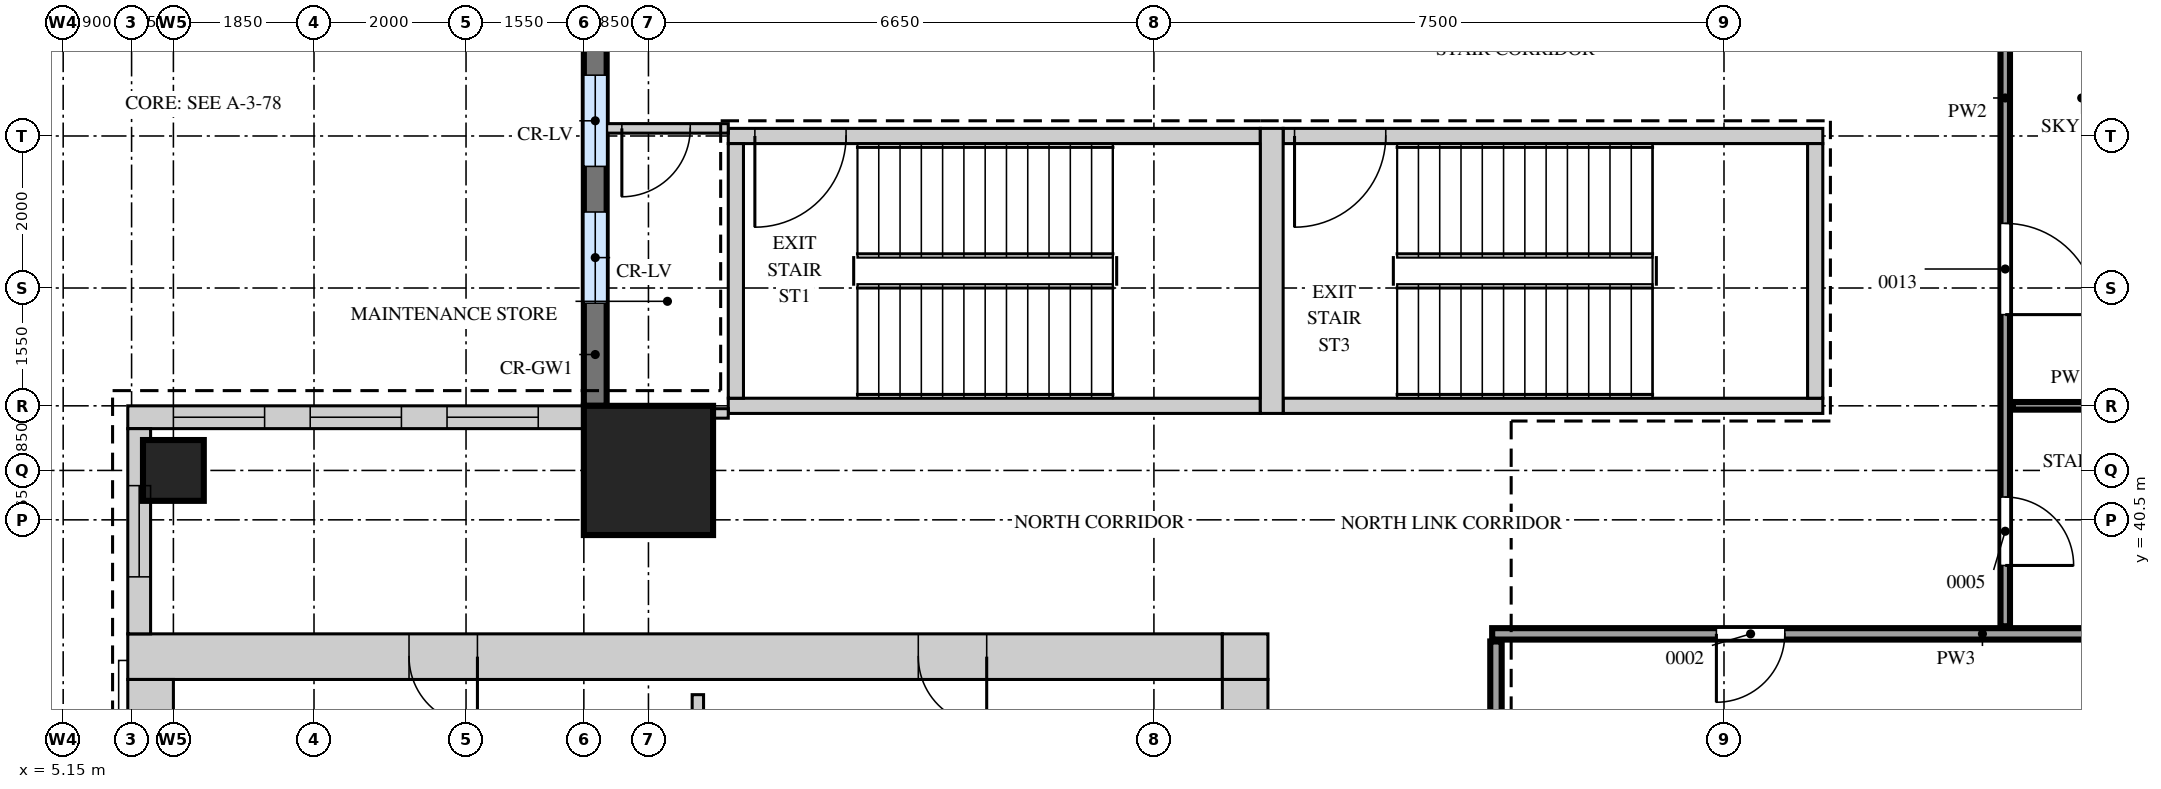
"""IFC4 building model, lengths in metres.
Left out: names, types, materials, properties, quantities, classifications, styles, units other than length and angle.
Written with IfcOpenShell. Run it as: python <this file> out.ifc"""

import sys

from ifc_helpers import new_model, si_unit, direction, frame, frame_2d, origin, origin_2d, place, context, subcontext, project, spatial, rectangle, extrude, source, transform, mapped, element, fill, save


model = new_model("IFC4")
c1 = context("Model", 3, precision=1e-05, world=origin(), true_north=direction((0.0, 1.0)))
c2 = subcontext(c1, "Body", "Model", "MODEL_VIEW")
j1 = project(units=[si_unit("LENGTHUNIT", "METRE"), si_unit("PLANEANGLEUNIT", "RADIAN")], contexts=[c1])
p1 = place(None, origin())
s1 = spatial("IfcSite", under=j1, at=p1, CompositionType="ELEMENT")
p2 = place(p1, origin())
s2 = spatial("IfcBuilding", under=s1, at=p2, CompositionType="ELEMENT")
p3 = place(p2, frame((0.0, 0.0, 339.2)))
s3 = spatial("IfcBuildingStorey", under=s2, at=p3, CompositionType="ELEMENT", Elevation=339.2)
m1 = source(origin(), c2, "Body", "SweptSolid", [
    extrude(rectangle(XDim=14.4, YDim=0.6, at=frame_2d((7.2, 0.0))), origin(), (0.0, 0.0, 1.0), 4.25),
])
p4 = place(p3, frame((6.0, 38.7, 0.0), z_axis=(0.0, 0.0, 1.0), x_axis=(1.0, 0.0, 0.0)))
e1 = element("IfcWall", 1, at=p4, inside=s3, PredefinedType="SHEAR", context=c2, shape_type="MappedRepresentation", body=[
    mapped(m1, transform((0.0, 0.0, 0.0))),
])
m2 = source(origin(), c2, "Body", "SweptSolid", [
    extrude(rectangle(XDim=0.9, YDim=2.1, at=frame_2d((0.45, 1.05))), frame((0.0, 0.31, 0.0), z_axis=(0.0, -1.0, 0.0), x_axis=(1.0, 0.0, 0.0)), (0.0, 0.0, 1.0), 0.62),
])
p5 = place(p4, frame((3.7, 0.0, 0.0)))
e2 = element("IfcOpeningElement", 2, at=p5, cuts=e1, PredefinedType="OPENING", context=c2, shape_type="MappedRepresentation", body=[
    mapped(m2, transform((0.0, 0.0, 0.0))),
])
p6 = place(p4, frame((10.4, 0.0, 0.0)))
e3 = element("IfcOpeningElement", 3, at=p6, cuts=e1, PredefinedType="OPENING", context=c2, shape_type="MappedRepresentation", body=[
    mapped(m2, transform((0.0, 0.0, 0.0))),
])
m3 = source(origin(), c2, "Body", "SweptSolid", [
    extrude(rectangle(XDim=0.6, YDim=0.6, at=frame_2d((0.3, 0.0))), origin(), (0.0, 0.0, 1.0), 4.25),
])
p7 = place(p3, frame((20.4, 38.7, 0.0), z_axis=(0.0, 0.0, 1.0), x_axis=(1.0, 0.0, 0.0)))
e4 = element("IfcWall", 4, at=p7, inside=s3, PredefinedType="SHEAR", context=c2, shape_type="MappedRepresentation", body=[
    mapped(m3, transform((0.0, 0.0, 0.0))),
])
m4 = source(origin(), c2, "Body", "SweptSolid", [
    extrude(rectangle(XDim=22.8, YDim=0.6, at=frame_2d((11.4, 0.0))), origin(), (0.0, 0.0, 1.0), 4.25),
])
p8 = place(p3, frame((20.7, 15.6, 0.0), z_axis=(0.0, 0.0, 1.0), x_axis=(0.0, 1.0, 0.0)))
e5 = element("IfcWall", 5, at=p8, inside=s3, PredefinedType="SHEAR", context=c2, shape_type="MappedRepresentation", body=[
    mapped(m4, transform((0.0, 0.0, 0.0))),
])
p9 = place(p8, frame((8.2, 0.0, 0.0)))
e6 = element("IfcOpeningElement", 6, at=p9, cuts=e5, PredefinedType="OPENING", context=c2, shape_type="MappedRepresentation", body=[
    mapped(m2, transform((0.0, 0.0, 0.0))),
])
p10 = place(p8, frame((11.35, 0.0, 0.0)))
e7 = element("IfcOpeningElement", 7, at=p10, cuts=e5, PredefinedType="OPENING", context=c2, shape_type="MappedRepresentation", body=[
    mapped(m2, transform((0.0, 0.0, 0.0))),
])
p11 = place(p8, frame((14.65, 0.0, 0.0)))
e8 = element("IfcOpeningElement", 8, at=p11, cuts=e5, PredefinedType="OPENING", context=c2, shape_type="MappedRepresentation", body=[
    mapped(m2, transform((0.0, 0.0, 0.0))),
])
p12 = place(p8, frame((1.55, 0.0, 0.0)))
e9 = element("IfcOpeningElement", 9, at=p12, cuts=e5, PredefinedType="OPENING", context=c2, shape_type="MappedRepresentation", body=[
    mapped(m2, transform((0.0, 0.0, 0.0))),
])
p13 = place(p8, frame((5.1, 0.0, 0.0)))
e10 = element("IfcOpeningElement", 10, at=p13, cuts=e5, PredefinedType="OPENING", context=c2, shape_type="MappedRepresentation", body=[
    mapped(m2, transform((0.0, 0.0, 0.0))),
])
p14 = place(p3, frame((6.3, 15.6, 0.0), z_axis=(0.0, 0.0, 1.0), x_axis=(0.0, 1.0, 0.0)))
e11 = element("IfcWall", 11, at=p14, inside=s3, PredefinedType="SHEAR", context=c2, shape_type="MappedRepresentation", body=[
    mapped(m4, transform((0.0, 0.0, 0.0))),
])
m5 = source(origin(), c2, "Body", "SweptSolid", [
    extrude(rectangle(XDim=7.0, YDim=0.2, at=frame_2d((3.5, 0.0))), origin(), (0.0, 0.0, 1.0), 4.25),
])
p15 = place(p3, frame((13.9, 45.55, 0.0), z_axis=(0.0, 0.0, 1.0), x_axis=(1.0, 0.0, 0.0)))
e12 = element("IfcWall", 12, at=p15, inside=s3, PredefinedType="SHEAR", context=c2, shape_type="MappedRepresentation", body=[
    mapped(m5, transform((0.0, 0.0, 0.0))),
])
m6 = source(origin(), c2, "Body", "SweptSolid", [
    extrude(rectangle(XDim=1.2, YDim=2.1, at=frame_2d((0.6, 1.05))), frame((0.0, 0.11, 0.0), z_axis=(0.0, -1.0, 0.0), x_axis=(1.0, 0.0, 0.0)), (0.0, 0.0, 1.0), 0.22),
])
p16 = place(p15, frame((0.35, 0.0, 0.0)))
e13 = element("IfcOpeningElement", 13, at=p16, cuts=e12, PredefinedType="OPENING", context=c2, shape_type="MappedRepresentation", body=[
    mapped(m6, transform((0.0, 0.0, 0.0))),
])
p17 = place(p3, frame((13.9, 42.0, 0.0), z_axis=(0.0, 0.0, 1.0), x_axis=(1.0, 0.0, 0.0)))
e14 = element("IfcWall", 14, at=p17, inside=s3, PredefinedType="SHEAR", context=c2, shape_type="MappedRepresentation", body=[
    mapped(m5, transform((0.0, 0.0, 0.0))),
])
m7 = source(origin(), c2, "Body", "SweptSolid", [
    extrude(rectangle(XDim=7.1, YDim=0.2, at=frame_2d((3.55, 0.0))), origin(), (0.0, 0.0, 1.0), 4.25),
])
p18 = place(p3, frame((21.2, 45.55, 0.0), z_axis=(0.0, 0.0, 1.0), x_axis=(1.0, 0.0, 0.0)))
e15 = element("IfcWall", 15, at=p18, inside=s3, PredefinedType="SHEAR", context=c2, shape_type="MappedRepresentation", body=[
    mapped(m7, transform((0.0, 0.0, 0.0))),
])
p19 = place(p18, frame((0.15, 0.0, 0.0)))
e16 = element("IfcOpeningElement", 16, at=p19, cuts=e15, PredefinedType="OPENING", context=c2, shape_type="MappedRepresentation", body=[
    mapped(m6, transform((0.0, 0.0, 0.0))),
])
p20 = place(p3, frame((21.2, 42.0, 0.0), z_axis=(0.0, 0.0, 1.0), x_axis=(1.0, 0.0, 0.0)))
e17 = element("IfcWall", 17, at=p20, inside=s3, PredefinedType="SHEAR", context=c2, shape_type="MappedRepresentation", body=[
    mapped(m7, transform((0.0, 0.0, 0.0))),
])
m8 = source(origin(), c2, "Body", "SweptSolid", [
    extrude(rectangle(XDim=3.75, YDim=0.3, at=frame_2d((1.875, 0.0))), origin(), (0.0, 0.0, 1.0), 4.25),
])
p21 = place(p3, frame((21.05, 41.9, 0.0), z_axis=(0.0, 0.0, 1.0), x_axis=(0.0, 1.0, 0.0)))
e18 = element("IfcWall", 18, at=p21, inside=s3, PredefinedType="SHEAR", context=c2, shape_type="MappedRepresentation", body=[
    mapped(m8, transform((0.0, 0.0, 0.0))),
])
m9 = source(origin(), c2, "Body", "SweptSolid", [
    extrude(rectangle(XDim=3.35, YDim=0.2, at=frame_2d((1.675, 0.0))), origin(), (0.0, 0.0, 1.0), 4.25),
])
for number, where, z_axis, x_axis in (
    (19, (14.0, 42.1, 0.0), (0.0, 0.0, 1.0), (0.0, 1.0, 0.0)),
    (20, (28.2, 42.1, 0.0), (0.0, 0.0, 1.0), (0.0, 1.0, 0.0)),
):
    element("IfcWall", number, at=place(p3, frame(where, z_axis=z_axis, x_axis=x_axis)), inside=s3, PredefinedType="SHEAR", context=c2, shape_type="MappedRepresentation", body=[
        mapped(m9, transform((0.0, 0.0, 0.0))),
    ])
m10 = source(origin(), c2, "Body", "SweptSolid", [
    extrude(rectangle(XDim=1.7, YDim=1.7, at=origin_2d()), origin(), (0.0, 0.0, 1.0), 4.5),
])
p22 = place(p3, frame((12.85, 41.15, 0.0), z_axis=(0.0, 0.0, 1.0), x_axis=(1.0, 0.0, 0.0)))
e21 = element("IfcColumn", 21, at=p22, inside=s3, PredefinedType="COLUMN", context=c2, shape_type="MappedRepresentation", body=[
    mapped(m10, transform((0.0, 0.0, 0.0))),
])
m11 = source(origin(), c2, "Body", "SweptSolid", [
    extrude(rectangle(XDim=0.8, YDim=0.8, at=origin_2d()), origin(), (0.0, 0.0, 1.0), 4.5),
])
p23 = place(p3, frame((6.6, 41.15, 0.0), z_axis=(0.0, 0.0, 1.0), x_axis=(1.0, 0.0, 0.0)))
e22 = element("IfcColumn", 22, at=p23, inside=s3, PredefinedType="COLUMN", context=c2, shape_type="MappedRepresentation", body=[
    mapped(m11, transform((0.0, 0.0, 0.0))),
])
m12 = source(origin(), c2, "Body", "SweptSolid", [
    extrude(rectangle(XDim=5.7, YDim=0.3, at=frame_2d((2.85, 0.0))), origin(), (0.0, 0.0, 1.0), 4.5),
])
p24 = place(p3, frame((12.15, 47.7, 0.0), z_axis=(0.0, 0.0, 1.0), x_axis=(0.0, -1.0, 0.0)))
e23 = element("IfcWall", 23, at=p24, inside=s3, PredefinedType="SOLIDWALL", context=c2, shape_type="MappedRepresentation", body=[
    mapped(m12, transform((0.0, 0.0, 0.0))),
])
m13 = source(origin(), c2, "Body", "SweptSolid", [
    extrude(rectangle(XDim=1.2, YDim=2.4, at=frame_2d((0.6, 1.2))), frame((0.0, 0.16, 0.0), z_axis=(0.0, -1.0, 0.0), x_axis=(1.0, 0.0, 0.0)), (0.0, 0.0, 1.0), 0.32),
])
p25 = place(p24, frame((1.35, 0.0, 0.9)))
e24 = element("IfcOpeningElement", 24, at=p25, cuts=e23, PredefinedType="OPENING", context=c2, shape_type="MappedRepresentation", body=[
    mapped(m13, transform((0.0, 0.0, 0.0))),
])
p26 = place(p24, frame((3.15, 0.0, 0.9)))
e25 = element("IfcOpeningElement", 25, at=p26, cuts=e23, PredefinedType="OPENING", context=c2, shape_type="MappedRepresentation", body=[
    mapped(m13, transform((0.0, 0.0, 0.0))),
])
m14 = source(origin(), c2, "Body", "SweptSolid", [
    extrude(rectangle(XDim=6.0, YDim=0.3, at=frame_2d((3.0, 0.0))), origin(), (0.0, 0.0, 1.0), 4.5),
])
p27 = place(p3, frame((12.0, 41.85, 0.0), z_axis=(0.0, 0.0, 1.0), x_axis=(-1.0, 0.0, 0.0)))
e26 = element("IfcWall", 26, at=p27, inside=s3, PredefinedType="SOLIDWALL", context=c2, shape_type="MappedRepresentation", body=[
    mapped(m14, transform((0.0, 0.0, 0.0))),
])
p28 = place(p27, frame((0.6, 0.0, 0.9)))
e27 = element("IfcOpeningElement", 27, at=p28, cuts=e26, PredefinedType="OPENING", context=c2, shape_type="MappedRepresentation", body=[
    mapped(m13, transform((0.0, 0.0, 0.0))),
])
p29 = place(p27, frame((2.4, 0.0, 0.9)))
e28 = element("IfcOpeningElement", 28, at=p29, cuts=e26, PredefinedType="OPENING", context=c2, shape_type="MappedRepresentation", body=[
    mapped(m13, transform((0.0, 0.0, 0.0))),
])
p30 = place(p27, frame((4.2, 0.0, 0.9)))
e29 = element("IfcOpeningElement", 29, at=p30, cuts=e26, PredefinedType="OPENING", context=c2, shape_type="MappedRepresentation", body=[
    mapped(m13, transform((0.0, 0.0, 0.0))),
])
m15 = source(origin(), c2, "Body", "SweptSolid", [
    extrude(rectangle(XDim=2.7, YDim=0.3, at=frame_2d((1.35, 0.0))), origin(), (0.0, 0.0, 1.0), 4.5),
])
p31 = place(p3, frame((6.15, 41.7, 0.0), z_axis=(0.0, 0.0, 1.0), x_axis=(0.0, -1.0, 0.0)))
e30 = element("IfcWall", 30, at=p31, inside=s3, PredefinedType="SOLIDWALL", context=c2, shape_type="MappedRepresentation", body=[
    mapped(m15, transform((0.0, 0.0, 0.0))),
])
p32 = place(p31, frame((0.75, 0.0, 0.9)))
e31 = element("IfcOpeningElement", 31, at=p32, cuts=e30, PredefinedType="OPENING", context=c2, shape_type="MappedRepresentation", body=[
    mapped(m13, transform((0.0, 0.0, 0.0))),
])
m16 = source(origin(), c2, "Body", "SweptSolid", [
    extrude(rectangle(XDim=32.6, YDim=0.15, at=frame_2d((16.3, 0.0))), origin(), (0.0, 0.0, 1.0), 4.3),
])
p33 = place(p3, frame((24.0, 6.3, 0.0), z_axis=(0.0, 0.0, 1.0), x_axis=(0.0, 1.0, 0.0)))
e32 = element("IfcWall", 32, at=p33, inside=s3, PredefinedType="PARTITIONING", context=c2, shape_type="MappedRepresentation", body=[
    mapped(m16, transform((0.0, 0.0, 0.0))),
])
m17 = source(origin(), c2, "Body", "SweptSolid", [
    extrude(rectangle(XDim=0.9, YDim=2.1, at=frame_2d((0.45, 1.05))), frame((0.0, 0.085, 0.0), z_axis=(0.0, -1.0, 0.0), x_axis=(1.0, 0.0, 0.0)), (0.0, 0.0, 1.0), 0.17),
])
p34 = place(p33, frame((3.1, 0.0, 0.0)))
e33 = element("IfcOpeningElement", 33, at=p34, cuts=e32, PredefinedType="OPENING", context=c2, shape_type="MappedRepresentation", body=[
    mapped(m17, transform((0.0, 0.0, 0.0))),
])
p35 = place(p33, frame((12.6, 0.0, 0.0)))
e34 = element("IfcOpeningElement", 34, at=p35, cuts=e32, PredefinedType="OPENING", context=c2, shape_type="MappedRepresentation", body=[
    mapped(m17, transform((0.0, 0.0, 0.0))),
])
p36 = place(p33, frame((21.9, 0.0, 0.0)))
e35 = element("IfcOpeningElement", 35, at=p36, cuts=e32, PredefinedType="OPENING", context=c2, shape_type="MappedRepresentation", body=[
    mapped(m17, transform((0.0, 0.0, 0.0))),
])
m18 = source(origin(), c2, "Body", "SweptSolid", [
    extrude(rectangle(XDim=5.9, YDim=0.15, at=frame_2d((2.95, 0.0))), origin(), (0.0, 0.0, 1.0), 4.3),
])
p37 = place(p3, frame((13.5, 32.3, 0.0), z_axis=(0.0, 0.0, 1.0), x_axis=(0.0, 1.0, 0.0)))
e36 = element("IfcWall", 36, at=p37, inside=s3, PredefinedType="PARTITIONING", context=c2, shape_type="MappedRepresentation", body=[
    mapped(m18, transform((0.0, 0.0, 0.0))),
])
m19 = source(origin(), c2, "Body", "SweptSolid", [
    extrude(rectangle(XDim=9.05, YDim=0.15, at=frame_2d((4.525, 0.0))), origin(), (0.0, 0.0, 1.0), 4.3),
])
p38 = place(p3, frame((23.95, 39.0, 0.0), z_axis=(0.0, 0.0, 1.0), x_axis=(1.0, 0.0, 0.0)))
e37 = element("IfcWall", 37, at=p38, inside=s3, PredefinedType="PARTITIONING", context=c2, shape_type="MappedRepresentation", body=[
    mapped(m19, transform((0.0, 0.0, 0.0))),
])
p39 = place(p38, frame((2.95, 0.0, 0.0)))
e38 = element("IfcOpeningElement", 38, at=p39, cuts=e37, PredefinedType="OPENING", context=c2, shape_type="MappedRepresentation", body=[
    mapped(m17, transform((0.0, 0.0, 0.0))),
])
m20 = source(origin(), c2, "Body", "SweptSolid", [
    extrude(rectangle(XDim=8.6, YDim=0.125, at=frame_2d((4.3, 0.0))), origin(), (0.0, 0.0, 1.0), 4.3),
])
p40 = place(p3, frame((30.7, 39.1, 0.0), z_axis=(0.0, 0.0, 1.0), x_axis=(0.0, 1.0, 0.0)))
e39 = element("IfcWall", 39, at=p40, inside=s3, PredefinedType="PARTITIONING", context=c2, shape_type="MappedRepresentation", body=[
    mapped(m20, transform((0.0, 0.0, 0.0))),
])
m21 = source(origin(), c2, "Body", "SweptSolid", [
    extrude(rectangle(XDim=0.9, YDim=2.1, at=frame_2d((0.45, 1.05))), frame((0.0, 0.073, 0.0), z_axis=(0.0, -1.0, 0.0), x_axis=(1.0, 0.0, 0.0)), (0.0, 0.0, 1.0), 0.145),
])
p41 = place(p40, frame((0.8, 0.0, 0.0)))
e40 = element("IfcOpeningElement", 40, at=p41, cuts=e39, PredefinedType="OPENING", context=c2, shape_type="MappedRepresentation", body=[
    mapped(m21, transform((0.0, 0.0, 0.0))),
])
m22 = source(origin(), c2, "Body", "SweptSolid", [
    extrude(rectangle(XDim=1.2, YDim=2.1, at=frame_2d((0.6, 1.05))), frame((0.0, 0.073, 0.0), z_axis=(0.0, -1.0, 0.0), x_axis=(1.0, 0.0, 0.0)), (0.0, 0.0, 1.0), 0.145),
])
p42 = place(p40, frame((4.1, 0.0, 0.0)))
e41 = element("IfcOpeningElement", 41, at=p42, cuts=e39, PredefinedType="OPENING", context=c2, shape_type="MappedRepresentation", body=[
    mapped(m22, transform((0.0, 0.0, 0.0))),
])
m23 = source(origin(), c2, "Body", "SweptSolid", [
    extrude(rectangle(XDim=1.9, YDim=0.125, at=frame_2d((0.95, 0.0))), origin(), (0.0, 0.0, 1.0), 4.3),
])
p43 = place(p3, frame((12.0, 41.9, 0.0), z_axis=(0.0, 0.0, 1.0), x_axis=(1.0, 0.0, 0.0)))
e42 = element("IfcWall", 42, at=p43, inside=s3, PredefinedType="PARTITIONING", context=c2, shape_type="MappedRepresentation", body=[
    mapped(m23, transform((0.0, 0.0, 0.0))),
])
m24 = source(origin(), c2, "Body", "SweptSolid", [
    extrude(rectangle(XDim=2.2, YDim=0.1, at=frame_2d((1.1, 0.0))), origin(), (0.0, 0.0, 1.0), 4.3),
])
p44 = place(p3, frame((30.8, 42.0, 0.0), z_axis=(0.0, 0.0, 1.0), x_axis=(1.0, 0.0, 0.0)))
e43 = element("IfcWall", 43, at=p44, inside=s3, PredefinedType="PARTITIONING", context=c2, shape_type="MappedRepresentation", body=[
    mapped(m24, transform((0.0, 0.0, 0.0))),
])
m25 = source(origin(), c2, "Body", "SweptSolid", [
    extrude(rectangle(XDim=1.6, YDim=0.125, at=frame_2d((0.8, 0.0))), origin(), (0.0, 0.0, 1.0), 4.3),
])
p45 = place(p3, frame((12.3, 45.65, 0.0), z_axis=(0.0, 0.0, 1.0), x_axis=(1.0, 0.0, 0.0)))
e44 = element("IfcWall", 44, at=p45, inside=s3, PredefinedType="PARTITIONING", context=c2, shape_type="MappedRepresentation", body=[
    mapped(m25, transform((0.0, 0.0, 0.0))),
])
p46 = place(p45, frame((0.2, 0.0, 0.0)))
e45 = element("IfcOpeningElement", 45, at=p46, cuts=e44, PredefinedType="OPENING", context=c2, shape_type="MappedRepresentation", body=[
    mapped(m21, transform((0.0, 0.0, 0.0))),
])
m26 = source(origin(), c2, "Body", "SweptSolid", [
    extrude(rectangle(XDim=1.2, YDim=2.4, at=frame_2d((0.6, 1.2))), frame((0.0, 0.03, 0.0), z_axis=(0.0, -1.0, 0.0), x_axis=(1.0, 0.0, 0.0)), (0.0, 0.0, 1.0), 0.06),
])
p47 = place(p25, origin())
e46 = element("IfcWindow", 46, at=p47, inside=s3, PartitioningType="SINGLE_PANEL", PredefinedType="WINDOW", context=c2, shape_type="MappedRepresentation", body=[
    mapped(m26, transform((0.0, 0.0, 0.0))),
])
fill(e24, e46)
p48 = place(p26, origin())
e47 = element("IfcWindow", 47, at=p48, inside=s3, PartitioningType="SINGLE_PANEL", PredefinedType="WINDOW", context=c2, shape_type="MappedRepresentation", body=[
    mapped(m26, transform((0.0, 0.0, 0.0))),
])
fill(e25, e47)
p49 = place(p28, origin())
e48 = element("IfcWindow", 48, at=p49, inside=s3, PartitioningType="SINGLE_PANEL", PredefinedType="WINDOW", context=c2, shape_type="MappedRepresentation", body=[
    mapped(m26, transform((0.0, 0.0, 0.0))),
])
fill(e27, e48)
p50 = place(p29, origin())
e49 = element("IfcWindow", 49, at=p50, inside=s3, PartitioningType="SINGLE_PANEL", PredefinedType="WINDOW", context=c2, shape_type="MappedRepresentation", body=[
    mapped(m26, transform((0.0, 0.0, 0.0))),
])
fill(e28, e49)
p51 = place(p30, origin())
e50 = element("IfcWindow", 50, at=p51, inside=s3, PartitioningType="SINGLE_PANEL", PredefinedType="WINDOW", context=c2, shape_type="MappedRepresentation", body=[
    mapped(m26, transform((0.0, 0.0, 0.0))),
])
fill(e29, e50)
p52 = place(p32, origin())
e51 = element("IfcWindow", 51, at=p52, inside=s3, PartitioningType="SINGLE_PANEL", PredefinedType="WINDOW", context=c2, shape_type="MappedRepresentation", body=[
    mapped(m26, transform((0.0, 0.0, 0.0))),
])
fill(e31, e51)
m27 = source(origin(), c2, "Body", "SweptSolid", [
    extrude(rectangle(XDim=0.9, YDim=2.1, at=frame_2d((0.45, 1.05))), frame((0.0, 0.025, 0.0), z_axis=(0.0, -1.0, 0.0), x_axis=(1.0, 0.0, 0.0)), (0.0, 0.0, 1.0), 0.05),
])
p53 = place(p46, origin())
e52 = element("IfcDoor", 52, at=p53, inside=s3, OperationType="SINGLE_SWING_LEFT", PredefinedType="DOOR", context=c2, shape_type="MappedRepresentation", body=[
    mapped(m27, transform((0.0, 0.0, 0.0))),
])
fill(e45, e52)
p54 = place(p39, origin())
e53 = element("IfcDoor", 53, at=p54, inside=s3, OperationType="SINGLE_SWING_LEFT", PredefinedType="DOOR", context=c2, shape_type="MappedRepresentation", body=[
    mapped(m27, transform((0.0, 0.0, 0.0))),
])
fill(e38, e53)
p55 = place(p41, origin())
e54 = element("IfcDoor", 54, at=p55, inside=s3, OperationType="SINGLE_SWING_LEFT", PredefinedType="DOOR", context=c2, shape_type="MappedRepresentation", body=[
    mapped(m27, transform((0.0, 0.0, 0.0))),
])
fill(e40, e54)
m28 = source(origin(), c2, "Body", "SweptSolid", [
    extrude(rectangle(XDim=1.2, YDim=2.1, at=frame_2d((0.6, 1.05))), frame((0.0, 0.025, 0.0), z_axis=(0.0, -1.0, 0.0), x_axis=(1.0, 0.0, 0.0)), (0.0, 0.0, 1.0), 0.05),
])
p56 = place(p42, origin())
e55 = element("IfcDoor", 55, at=p56, inside=s3, OperationType="SINGLE_SWING_LEFT", PredefinedType="DOOR", context=c2, shape_type="MappedRepresentation", body=[
    mapped(m28, transform((0.0, 0.0, 0.0))),
])
fill(e41, e55)
m29 = source(origin(), c2, "Body", "SweptSolid", [
    extrude(rectangle(XDim=0.9, YDim=2.1, at=frame_2d((0.45, 1.05))), frame((0.0, 0.25, 0.0), z_axis=(0.0, -1.0, 0.0), x_axis=(1.0, 0.0, 0.0)), (0.0, 0.0, 1.0), 0.5),
])
p57 = place(p5, origin())
e56 = element("IfcDoor", 56, at=p57, inside=s3, OperationType="SINGLE_SWING_RIGHT", PredefinedType="DOOR", context=c2, shape_type="MappedRepresentation", body=[
    mapped(m29, transform((0.0, 0.0, 0.0))),
])
fill(e2, e56)
p58 = place(p6, origin())
e57 = element("IfcDoor", 57, at=p58, inside=s3, OperationType="SINGLE_SWING_RIGHT", PredefinedType="DOOR", context=c2, shape_type="MappedRepresentation", body=[
    mapped(m29, transform((0.0, 0.0, 0.0))),
])
fill(e3, e57)
p59 = place(p16, origin())
e58 = element("IfcDoor", 58, at=p59, inside=s3, OperationType="SINGLE_SWING_LEFT", PredefinedType="DOOR", context=c2, shape_type="MappedRepresentation", body=[
    mapped(m28, transform((0.0, 0.0, 0.0))),
])
fill(e13, e58)
p60 = place(p19, origin())
e59 = element("IfcDoor", 59, at=p60, inside=s3, OperationType="SINGLE_SWING_LEFT", PredefinedType="DOOR", context=c2, shape_type="MappedRepresentation", body=[
    mapped(m28, transform((0.0, 0.0, 0.0))),
])
fill(e16, e59)
save(model, sys.argv[1])
